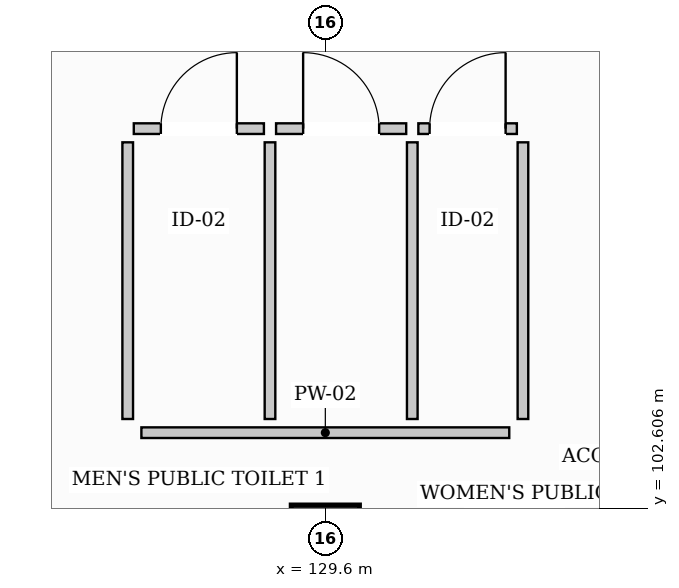
"""IFC4 building model, lengths in metres.
Left out: names, types, materials, properties, quantities, classifications, styles, units other than length and angle.
Written with IfcOpenShell. Run it as: python <this file> out.ifc"""

import sys

from ifc_helpers import new_model, si_unit, direction, frame, frame_2d, origin, origin_2d, place, context, subcontext, project, spatial, rectangle, extrude, element, fill, save


model = new_model("IFC4")
c1 = context("Model", 3, precision=1e-05, world=origin(), true_north=direction((0.0, 1.0)))
c2 = subcontext(c1, "Body", "Model", "MODEL_VIEW")
j1 = project(units=[si_unit("LENGTHUNIT", "METRE"), si_unit("PLANEANGLEUNIT", "RADIAN")], contexts=[c1])
p1 = place(None, origin())
s1 = spatial("IfcSite", under=j1, at=p1, CompositionType="ELEMENT")
p2 = place(p1, origin())
s2 = spatial("IfcBuilding", under=s1, at=p2, CompositionType="ELEMENT")
p3 = place(p2, origin())
s3 = spatial("IfcBuildingStorey", under=s2, at=p3, CompositionType="ELEMENT", Elevation=0.0)
p4 = place(p3, frame((129.6, 102.2, 0.0), z_axis=(0.0, 0.0, 1.0), x_axis=(1.0, 0.0, 0.0)))
e1 = element("IfcColumn", 1, at=p4, inside=s3, PredefinedType="COLUMN", context=c2, shape_type="SweptSolid", body=[
    extrude(rectangle(XDim=0.9, YDim=0.9, at=origin_2d()), origin(), (0.0, 0.0, 1.0), 5.1),
])
p5 = place(p3, frame((127.18, 103.6, 0.0), z_axis=(0.0, 0.0, 1.0), x_axis=(1.0, 0.0, 0.0)))
e2 = element("IfcWall", 2, at=p5, inside=s3, PredefinedType="PARTITIONING", context=c2, shape_type="SweptSolid", body=[
    extrude(rectangle(XDim=4.84, YDim=0.14, at=frame_2d((2.42, 0.0))), origin(), (0.0, 0.0, 1.0), 4.03),
])
for number, where, z_axis, x_axis in (
    (3, (127.0, 103.78, 0.0), (0.0, 0.0, 1.0), (0.0, 1.0, 0.0)),
    (4, (132.2, 103.78, 0.0), (0.0, 0.0, 1.0), (0.0, 1.0, 0.0)),
    (5, (128.872, 103.78, 0.0), (0.0, 0.0, 1.0), (0.0, 1.0, 0.0)),
    (6, (130.744, 103.78, 0.0), (0.0, 0.0, 1.0), (0.0, 1.0, 0.0)),
):
    element("IfcWall", number, at=place(p3, frame(where, z_axis=z_axis, x_axis=x_axis)), inside=s3, PredefinedType="PARTITIONING", context=c2, shape_type="SweptSolid", body=[
        extrude(rectangle(XDim=3.64, YDim=0.14, at=frame_2d((1.82, 0.0))), origin(), (0.0, 0.0, 1.0), 4.78),
    ])
p6 = place(p3, frame((127.08, 107.6, 0.0), z_axis=(0.0, 0.0, 1.0), x_axis=(1.0, 0.0, 0.0)))
e7 = element("IfcWall", 7, at=p6, inside=s3, PredefinedType="PARTITIONING", context=c2, shape_type="SweptSolid", body=[
    extrude(rectangle(XDim=1.712, YDim=0.14, at=frame_2d((0.856, 0.0))), origin(), (0.0, 0.0, 1.0), 4.78),
])
p7 = place(p6, frame((0.356, 0.0, 0.0)))
e8 = element("IfcOpeningElement", 8, at=p7, cuts=e7, PredefinedType="OPENING", context=c2, shape_type="SweptSolid", body=[
    extrude(rectangle(XDim=1.0, YDim=2.15, at=frame_2d((0.5, 1.075))), frame((0.0, 0.08, 0.0), z_axis=(0.0, -1.0, 0.0), x_axis=(1.0, 0.0, 0.0)), (0.0, 0.0, 1.0), 0.16),
])
p8 = place(p3, frame((128.952, 107.6, 0.0), z_axis=(0.0, 0.0, 1.0), x_axis=(1.0, 0.0, 0.0)))
e9 = element("IfcWall", 9, at=p8, inside=s3, PredefinedType="PARTITIONING", context=c2, shape_type="SweptSolid", body=[
    extrude(rectangle(XDim=1.712, YDim=0.14, at=frame_2d((0.856, 0.0))), origin(), (0.0, 0.0, 1.0), 4.03),
])
p9 = place(p8, frame((0.356, 0.0, 0.0)))
e10 = element("IfcOpeningElement", 10, at=p9, cuts=e9, PredefinedType="OPENING", context=c2, shape_type="SweptSolid", body=[
    extrude(rectangle(XDim=1.0, YDim=2.15, at=frame_2d((0.5, 1.075))), frame((0.0, 0.08, 0.0), z_axis=(0.0, -1.0, 0.0), x_axis=(1.0, 0.0, 0.0)), (0.0, 0.0, 1.0), 0.16),
])
p10 = place(p3, frame((130.824, 107.6, 0.0), z_axis=(0.0, 0.0, 1.0), x_axis=(1.0, 0.0, 0.0)))
e11 = element("IfcWall", 11, at=p10, inside=s3, PredefinedType="PARTITIONING", context=c2, shape_type="SweptSolid", body=[
    extrude(rectangle(XDim=1.296, YDim=0.14, at=frame_2d((0.648, 0.0))), origin(), (0.0, 0.0, 1.0), 4.78),
])
p11 = place(p10, frame((0.148, 0.0, 0.0)))
e12 = element("IfcOpeningElement", 12, at=p11, cuts=e11, PredefinedType="OPENING", context=c2, shape_type="SweptSolid", body=[
    extrude(rectangle(XDim=1.0, YDim=2.15, at=frame_2d((0.5, 1.075))), frame((0.0, 0.08, 0.0), z_axis=(0.0, -1.0, 0.0), x_axis=(1.0, 0.0, 0.0)), (0.0, 0.0, 1.0), 0.16),
])
p12 = place(p7, origin())
e13 = element("IfcDoor", 13, at=p12, inside=s3, OperationType="SINGLE_SWING_RIGHT", PredefinedType="DOOR", context=c2, shape_type="SweptSolid", body=[
    extrude(rectangle(XDim=1.0, YDim=2.15, at=frame_2d((0.5, 1.075))), frame((0.0, 0.025, 0.0), z_axis=(0.0, -1.0, 0.0), x_axis=(1.0, 0.0, 0.0)), (0.0, 0.0, 1.0), 0.05),
])
fill(e8, e13)
p13 = place(p9, origin())
e14 = element("IfcDoor", 14, at=p13, inside=s3, OperationType="SINGLE_SWING_LEFT", PredefinedType="DOOR", context=c2, shape_type="SweptSolid", body=[
    extrude(rectangle(XDim=1.0, YDim=2.15, at=frame_2d((0.5, 1.075))), frame((0.0, 0.025, 0.0), z_axis=(0.0, -1.0, 0.0), x_axis=(1.0, 0.0, 0.0)), (0.0, 0.0, 1.0), 0.05),
])
fill(e10, e14)
p14 = place(p11, origin())
e15 = element("IfcDoor", 15, at=p14, inside=s3, OperationType="SINGLE_SWING_RIGHT", PredefinedType="DOOR", context=c2, shape_type="SweptSolid", body=[
    extrude(rectangle(XDim=1.0, YDim=2.15, at=frame_2d((0.5, 1.075))), frame((0.0, 0.025, 0.0), z_axis=(0.0, -1.0, 0.0), x_axis=(1.0, 0.0, 0.0)), (0.0, 0.0, 1.0), 0.05),
])
fill(e12, e15)
save(model, sys.argv[1])
